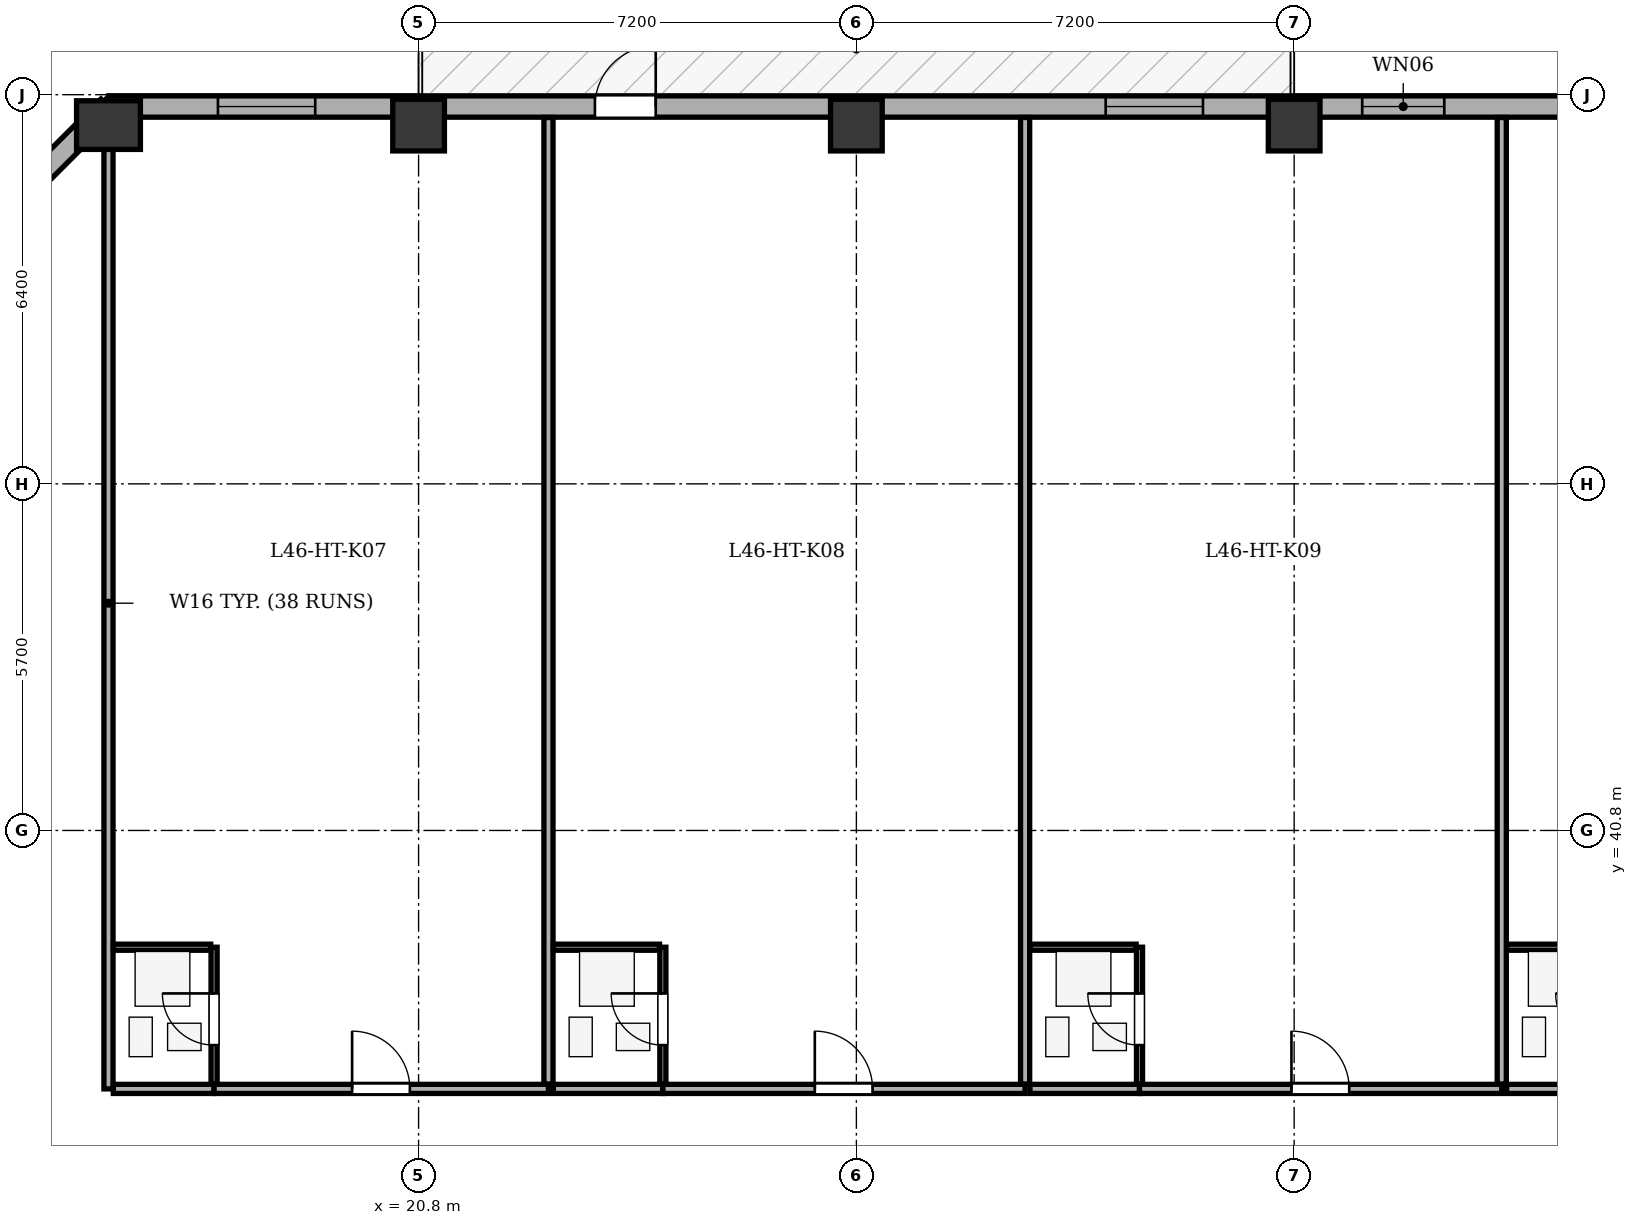
"""IFC4 building model, lengths in metres.
Left out: names, types, materials, properties, quantities, classifications, styles, units other than length and angle.
Written with IfcOpenShell. Run it as: python <this file> out.ifc"""

import sys

from ifc_helpers import new_model, si_unit, direction, frame, frame_2d, origin, origin_2d, place, context, subcontext, project, spatial, rectangle, extrude, element, fill, save


model = new_model("IFC4")
c1 = context("Model", 3, precision=1e-05, world=origin(), true_north=direction((0.0, 1.0)))
c2 = subcontext(c1, "Body", "Model", "MODEL_VIEW")
j1 = project(units=[si_unit("LENGTHUNIT", "METRE"), si_unit("PLANEANGLEUNIT", "RADIAN")], contexts=[c1])
p1 = place(None, origin())
s1 = spatial("IfcSite", under=j1, at=p1, CompositionType="ELEMENT")
p2 = place(p1, origin())
s2 = spatial("IfcBuilding", under=s1, at=p2, CompositionType="ELEMENT")
p3 = place(p2, frame((0.0, 0.0, 179.8)))
s3 = spatial("IfcBuildingStorey", under=s2, at=p3, CompositionType="ELEMENT", Elevation=179.8)
p4 = place(p3, frame((15.7, 52.4, 0.0), z_axis=(0.0, 0.0, 1.0), x_axis=(1.0, 0.0, 0.0)))
e1 = element("IfcColumn", 1, at=p4, inside=s3, PredefinedType="COLUMN", context=c2, shape_type="SweptSolid", body=[
    extrude(rectangle(XDim=0.8, YDim=1.05, at=origin_2d()), origin(), (0.0, 0.0, 1.0), 3.5),
])
for number, where, z_axis, x_axis in (
    (2, (20.8, 52.4, 0.0), (0.0, 0.0, 1.0), (1.0, 0.0, 0.0)),
    (3, (28.0, 52.4, 0.0), (0.0, 0.0, 1.0), (1.0, 0.0, 0.0)),
    (4, (35.2, 52.4, 0.0), (0.0, 0.0, 1.0), (1.0, 0.0, 0.0)),
):
    element("IfcColumn", number, at=place(p3, frame(where, z_axis=z_axis, x_axis=x_axis)), inside=s3, PredefinedType="COLUMN", context=c2, shape_type="SweptSolid", body=[
        extrude(rectangle(XDim=0.85, YDim=0.85, at=origin_2d()), origin(), (0.0, 0.0, 1.0), 3.5),
    ])
p5 = place(p3, frame((10.895, 47.9, 0.0), z_axis=(0.0, 0.0, 1.0), x_axis=(0.707088817216, 0.7071247447, 0.0)))
e5 = element("IfcWall", 5, at=p5, inside=s3, PredefinedType="STANDARD", context=c2, shape_type="SweptSolid", body=[
    extrude(rectangle(XDim=6.795, YDim=0.35, at=frame_2d((3.398, 0.0))), origin(), (0.0, 0.0, 1.0), 2.435),
])
p6 = place(p5, frame((2.698, 0.0, 0.75)))
e6 = element("IfcOpeningElement", 6, at=p6, cuts=e5, PredefinedType="OPENING", context=c2, shape_type="SweptSolid", body=[
    extrude(rectangle(XDim=1.4, YDim=1.565, at=frame_2d((0.7, 0.782))), frame((0.0, 0.185, 0.0), z_axis=(0.0, -1.0, 0.0), x_axis=(1.0, 0.0, 0.0)), (0.0, 0.0, 1.0), 0.37),
])
p7 = place(p3, frame((15.7, 52.705, 0.0), z_axis=(0.0, 0.0, 1.0), x_axis=(1.0, 0.0, 0.0)))
e7 = element("IfcWall", 7, at=p7, inside=s3, PredefinedType="STANDARD", context=c2, shape_type="SweptSolid", body=[
    extrude(rectangle(XDim=35.0, YDim=0.35, at=frame_2d((17.5, 0.0))), origin(), (0.0, 0.0, 1.0), 2.435),
])
p8 = place(p7, frame((8.0, 0.0, 0.0)))
e8 = element("IfcOpeningElement", 8, at=p8, cuts=e7, PredefinedType="OPENING", context=c2, shape_type="SweptSolid", body=[
    extrude(rectangle(XDim=1.0, YDim=2.02, at=frame_2d((0.5, 1.01))), frame((0.0, 0.185, 0.0), z_axis=(0.0, -1.0, 0.0), x_axis=(1.0, 0.0, 0.0)), (0.0, 0.0, 1.0), 0.37),
])
p9 = place(p7, frame((1.8, 0.0, 0.75)))
e9 = element("IfcOpeningElement", 9, at=p9, cuts=e7, PredefinedType="OPENING", context=c2, shape_type="SweptSolid", body=[
    extrude(rectangle(XDim=1.6, YDim=1.565, at=frame_2d((0.8, 0.782))), frame((0.0, 0.185, 0.0), z_axis=(0.0, -1.0, 0.0), x_axis=(1.0, 0.0, 0.0)), (0.0, 0.0, 1.0), 0.37),
])
p10 = place(p7, frame((16.4, 0.0, 0.75)))
e10 = element("IfcOpeningElement", 10, at=p10, cuts=e7, PredefinedType="OPENING", context=c2, shape_type="SweptSolid", body=[
    extrude(rectangle(XDim=1.6, YDim=1.565, at=frame_2d((0.8, 0.782))), frame((0.0, 0.185, 0.0), z_axis=(0.0, -1.0, 0.0), x_axis=(1.0, 0.0, 0.0)), (0.0, 0.0, 1.0), 0.37),
])
p11 = place(p7, frame((20.619, 0.0, 0.75)))
e11 = element("IfcOpeningElement", 11, at=p11, cuts=e7, PredefinedType="OPENING", context=c2, shape_type="SweptSolid", body=[
    extrude(rectangle(XDim=1.35, YDim=1.565, at=frame_2d((0.675, 0.782))), frame((0.0, 0.185, 0.0), z_axis=(0.0, -1.0, 0.0), x_axis=(1.0, 0.0, 0.0)), (0.0, 0.0, 1.0), 0.37),
])
p12 = place(p7, frame((24.807, 0.0, 0.75)))
e12 = element("IfcOpeningElement", 12, at=p12, cuts=e7, PredefinedType="OPENING", context=c2, shape_type="SweptSolid", body=[
    extrude(rectangle(XDim=1.6, YDim=1.565, at=frame_2d((0.8, 0.782))), frame((0.0, 0.185, 0.0), z_axis=(0.0, -1.0, 0.0), x_axis=(1.0, 0.0, 0.0)), (0.0, 0.0, 1.0), 0.37),
])
p13 = place(p7, frame((31.637, 0.0, 0.75)))
e13 = element("IfcOpeningElement", 13, at=p13, cuts=e7, PredefinedType="OPENING", context=c2, shape_type="SweptSolid", body=[
    extrude(rectangle(XDim=1.6, YDim=1.565, at=frame_2d((0.8, 0.782))), frame((0.0, 0.185, 0.0), z_axis=(0.0, -1.0, 0.0), x_axis=(1.0, 0.0, 0.0)), (0.0, 0.0, 1.0), 0.37),
])
p14 = place(p3, frame((15.7, 36.55, 0.0), z_axis=(0.0, 0.0, 1.0), x_axis=(0.0, 1.0, 0.0)))
e14 = element("IfcWall", 14, at=p14, inside=s3, PredefinedType="PARTITIONING", context=c2, shape_type="SweptSolid", body=[
    extrude(rectangle(XDim=15.975, YDim=0.15, at=frame_2d((7.987, 0.0))), origin(), (0.0, 0.0, 1.0), 3.05),
])
p15 = place(p3, frame((15.78, 36.55, 0.0), z_axis=(0.0, 0.0, 1.0), x_axis=(1.0, 0.0, 0.0)))
e15 = element("IfcWall", 15, at=p15, inside=s3, PredefinedType="PARTITIONING", context=c2, shape_type="SweptSolid", body=[
    extrude(rectangle(XDim=1.656, YDim=0.15, at=frame_2d((0.828, 0.0))), origin(), (0.0, 0.0, 1.0), 3.05),
])
p16 = place(p3, frame((17.437, 36.55, 0.0), z_axis=(0.0, 0.0, 1.0), x_axis=(1.0, 0.0, 0.0)))
e16 = element("IfcWall", 16, at=p16, inside=s3, PredefinedType="PARTITIONING", context=c2, shape_type="SweptSolid", body=[
    extrude(rectangle(XDim=5.5, YDim=0.15, at=frame_2d((2.75, 0.0))), origin(), (0.0, 0.0, 1.0), 3.05),
])
p17 = place(p16, frame((2.27, 0.0, 0.0)))
e17 = element("IfcOpeningElement", 17, at=p17, cuts=e16, PredefinedType="OPENING", context=c2, shape_type="SweptSolid", body=[
    extrude(rectangle(XDim=0.95, YDim=2.1, at=frame_2d((0.475, 1.05))), frame((0.0, 0.085, 0.0), z_axis=(0.0, -1.0, 0.0), x_axis=(1.0, 0.0, 0.0)), (0.0, 0.0, 1.0), 0.17),
])
p18 = place(p3, frame((17.437, 36.63, 0.0), z_axis=(0.0, 0.0, 1.0), x_axis=(0.0, 1.0, 0.0)))
e18 = element("IfcWall", 18, at=p18, inside=s3, PredefinedType="PARTITIONING", context=c2, shape_type="SweptSolid", body=[
    extrude(rectangle(XDim=2.25, YDim=0.1, at=frame_2d((1.125, 0.0))), origin(), (0.0, 0.0, 1.0), 3.05),
])
p19 = place(p18, frame((0.64, 0.0, 0.0)))
e19 = element("IfcOpeningElement", 19, at=p19, cuts=e18, PredefinedType="OPENING", context=c2, shape_type="SweptSolid", body=[
    extrude(rectangle(XDim=0.85, YDim=2.05, at=frame_2d((0.425, 1.025))), frame((0.0, 0.06, 0.0), z_axis=(0.0, -1.0, 0.0), x_axis=(1.0, 0.0, 0.0)), (0.0, 0.0, 1.0), 0.12),
])
p20 = place(p3, frame((15.78, 38.88, 0.0), z_axis=(0.0, 0.0, 1.0), x_axis=(1.0, 0.0, 0.0)))
e20 = element("IfcWall", 20, at=p20, inside=s3, PredefinedType="PARTITIONING", context=c2, shape_type="SweptSolid", body=[
    extrude(rectangle(XDim=1.602, YDim=0.1, at=frame_2d((0.801, 0.0))), origin(), (0.0, 0.0, 1.0), 3.05),
])
p21 = place(p3, frame((22.936, 36.63, 0.0), z_axis=(0.0, 0.0, 1.0), x_axis=(0.0, 1.0, 0.0)))
e21 = element("IfcWall", 21, at=p21, inside=s3, PredefinedType="PARTITIONING", context=c2, shape_type="SweptSolid", body=[
    extrude(rectangle(XDim=15.895, YDim=0.15, at=frame_2d((7.948, 0.0))), origin(), (0.0, 0.0, 1.0), 3.05),
])
p22 = place(p3, frame((23.016, 36.55, 0.0), z_axis=(0.0, 0.0, 1.0), x_axis=(1.0, 0.0, 0.0)))
e22 = element("IfcWall", 22, at=p22, inside=s3, PredefinedType="PARTITIONING", context=c2, shape_type="SweptSolid", body=[
    extrude(rectangle(XDim=1.801, YDim=0.15, at=frame_2d((0.901, 0.0))), origin(), (0.0, 0.0, 1.0), 3.05),
])
p23 = place(p3, frame((24.817, 36.55, 0.0), z_axis=(0.0, 0.0, 1.0), x_axis=(1.0, 0.0, 0.0)))
e23 = element("IfcWall", 23, at=p23, inside=s3, PredefinedType="PARTITIONING", context=c2, shape_type="SweptSolid", body=[
    extrude(rectangle(XDim=5.958, YDim=0.15, at=frame_2d((2.979, 0.0))), origin(), (0.0, 0.0, 1.0), 3.05),
])
p24 = place(p23, frame((2.499, 0.0, 0.0)))
e24 = element("IfcOpeningElement", 24, at=p24, cuts=e23, PredefinedType="OPENING", context=c2, shape_type="SweptSolid", body=[
    extrude(rectangle(XDim=0.95, YDim=2.1, at=frame_2d((0.475, 1.05))), frame((0.0, 0.085, 0.0), z_axis=(0.0, -1.0, 0.0), x_axis=(1.0, 0.0, 0.0)), (0.0, 0.0, 1.0), 0.17),
])
p25 = place(p3, frame((24.817, 36.63, 0.0), z_axis=(0.0, 0.0, 1.0), x_axis=(0.0, 1.0, 0.0)))
e25 = element("IfcWall", 25, at=p25, inside=s3, PredefinedType="PARTITIONING", context=c2, shape_type="SweptSolid", body=[
    extrude(rectangle(XDim=2.25, YDim=0.1, at=frame_2d((1.125, 0.0))), origin(), (0.0, 0.0, 1.0), 3.05),
])
p26 = place(p25, frame((0.64, 0.0, 0.0)))
e26 = element("IfcOpeningElement", 26, at=p26, cuts=e25, PredefinedType="OPENING", context=c2, shape_type="SweptSolid", body=[
    extrude(rectangle(XDim=0.85, YDim=2.05, at=frame_2d((0.425, 1.025))), frame((0.0, 0.06, 0.0), z_axis=(0.0, -1.0, 0.0), x_axis=(1.0, 0.0, 0.0)), (0.0, 0.0, 1.0), 0.12),
])
p27 = place(p3, frame((23.016, 38.88, 0.0), z_axis=(0.0, 0.0, 1.0), x_axis=(1.0, 0.0, 0.0)))
e27 = element("IfcWall", 27, at=p27, inside=s3, PredefinedType="PARTITIONING", context=c2, shape_type="SweptSolid", body=[
    extrude(rectangle(XDim=1.746, YDim=0.1, at=frame_2d((0.873, 0.0))), origin(), (0.0, 0.0, 1.0), 3.05),
])
p28 = place(p3, frame((30.775, 36.63, 0.0), z_axis=(0.0, 0.0, 1.0), x_axis=(0.0, 1.0, 0.0)))
e28 = element("IfcWall", 28, at=p28, inside=s3, PredefinedType="PARTITIONING", context=c2, shape_type="SweptSolid", body=[
    extrude(rectangle(XDim=15.895, YDim=0.15, at=frame_2d((7.948, 0.0))), origin(), (0.0, 0.0, 1.0), 3.05),
])
p29 = place(p3, frame((30.855, 36.55, 0.0), z_axis=(0.0, 0.0, 1.0), x_axis=(1.0, 0.0, 0.0)))
e29 = element("IfcWall", 29, at=p29, inside=s3, PredefinedType="PARTITIONING", context=c2, shape_type="SweptSolid", body=[
    extrude(rectangle(XDim=1.802, YDim=0.15, at=frame_2d((0.901, 0.0))), origin(), (0.0, 0.0, 1.0), 3.05),
])
p30 = place(p3, frame((32.656, 36.55, 0.0), z_axis=(0.0, 0.0, 1.0), x_axis=(1.0, 0.0, 0.0)))
e30 = element("IfcWall", 30, at=p30, inside=s3, PredefinedType="PARTITIONING", context=c2, shape_type="SweptSolid", body=[
    extrude(rectangle(XDim=5.958, YDim=0.15, at=frame_2d((2.979, 0.0))), origin(), (0.0, 0.0, 1.0), 3.05),
])
p31 = place(p30, frame((2.499, 0.0, 0.0)))
e31 = element("IfcOpeningElement", 31, at=p31, cuts=e30, PredefinedType="OPENING", context=c2, shape_type="SweptSolid", body=[
    extrude(rectangle(XDim=0.95, YDim=2.1, at=frame_2d((0.475, 1.05))), frame((0.0, 0.085, 0.0), z_axis=(0.0, -1.0, 0.0), x_axis=(1.0, 0.0, 0.0)), (0.0, 0.0, 1.0), 0.17),
])
p32 = place(p3, frame((32.656, 36.63, 0.0), z_axis=(0.0, 0.0, 1.0), x_axis=(0.0, 1.0, 0.0)))
e32 = element("IfcWall", 32, at=p32, inside=s3, PredefinedType="PARTITIONING", context=c2, shape_type="SweptSolid", body=[
    extrude(rectangle(XDim=2.25, YDim=0.1, at=frame_2d((1.125, 0.0))), origin(), (0.0, 0.0, 1.0), 3.05),
])
p33 = place(p32, frame((0.64, 0.0, 0.0)))
e33 = element("IfcOpeningElement", 33, at=p33, cuts=e32, PredefinedType="OPENING", context=c2, shape_type="SweptSolid", body=[
    extrude(rectangle(XDim=0.85, YDim=2.05, at=frame_2d((0.425, 1.025))), frame((0.0, 0.06, 0.0), z_axis=(0.0, -1.0, 0.0), x_axis=(1.0, 0.0, 0.0)), (0.0, 0.0, 1.0), 0.12),
])
p34 = place(p3, frame((30.855, 38.88, 0.0), z_axis=(0.0, 0.0, 1.0), x_axis=(1.0, 0.0, 0.0)))
e34 = element("IfcWall", 34, at=p34, inside=s3, PredefinedType="PARTITIONING", context=c2, shape_type="SweptSolid", body=[
    extrude(rectangle(XDim=1.746, YDim=0.1, at=frame_2d((0.873, 0.0))), origin(), (0.0, 0.0, 1.0), 3.05),
])
p35 = place(p3, frame((38.614, 36.63, 0.0), z_axis=(0.0, 0.0, 1.0), x_axis=(0.0, 1.0, 0.0)))
e35 = element("IfcWall", 35, at=p35, inside=s3, PredefinedType="PARTITIONING", context=c2, shape_type="SweptSolid", body=[
    extrude(rectangle(XDim=15.895, YDim=0.15, at=frame_2d((7.948, 0.0))), origin(), (0.0, 0.0, 1.0), 2.485),
])
p36 = place(p3, frame((38.694, 36.55, 0.0), z_axis=(0.0, 0.0, 1.0), x_axis=(1.0, 0.0, 0.0)))
e36 = element("IfcWall", 36, at=p36, inside=s3, PredefinedType="PARTITIONING", context=c2, shape_type="SweptSolid", body=[
    extrude(rectangle(XDim=1.656, YDim=0.15, at=frame_2d((0.828, 0.0))), origin(), (0.0, 0.0, 1.0), 3.05),
])
p37 = place(p3, frame((38.694, 38.88, 0.0), z_axis=(0.0, 0.0, 1.0), x_axis=(1.0, 0.0, 0.0)))
e37 = element("IfcWall", 37, at=p37, inside=s3, PredefinedType="PARTITIONING", context=c2, shape_type="SweptSolid", body=[
    extrude(rectangle(XDim=1.602, YDim=0.1, at=frame_2d((0.801, 0.0))), origin(), (0.0, 0.0, 1.0), 3.05),
])
p38 = place(p8, origin())
e38 = element("IfcDoor", 38, at=p38, inside=s3, OperationType="SINGLE_SWING_RIGHT", PredefinedType="DOOR", context=c2, shape_type="SweptSolid", body=[
    extrude(rectangle(XDim=1.0, YDim=2.02, at=frame_2d((0.5, 1.01))), frame((0.0, 0.025, 0.0), z_axis=(0.0, -1.0, 0.0), x_axis=(1.0, 0.0, 0.0)), (0.0, 0.0, 1.0), 0.05),
])
fill(e8, e38)
p39 = place(p9, origin())
e39 = element("IfcWindow", 39, at=p39, inside=s3, PartitioningType="SINGLE_PANEL", PredefinedType="WINDOW", context=c2, shape_type="SweptSolid", body=[
    extrude(rectangle(XDim=1.6, YDim=1.565, at=frame_2d((0.8, 0.782))), frame((0.0, -0.01, 0.0), z_axis=(0.0, -1.0, 0.0), x_axis=(1.0, 0.0, 0.0)), (0.0, 0.0, 1.0), 0.06),
])
fill(e9, e39)
p40 = place(p10, origin())
e40 = element("IfcWindow", 40, at=p40, inside=s3, PartitioningType="SINGLE_PANEL", PredefinedType="WINDOW", context=c2, shape_type="SweptSolid", body=[
    extrude(rectangle(XDim=1.6, YDim=1.565, at=frame_2d((0.8, 0.782))), frame((0.0, -0.01, 0.0), z_axis=(0.0, -1.0, 0.0), x_axis=(1.0, 0.0, 0.0)), (0.0, 0.0, 1.0), 0.06),
])
fill(e10, e40)
p41 = place(p11, origin())
e41 = element("IfcWindow", 41, at=p41, inside=s3, PartitioningType="SINGLE_PANEL", PredefinedType="WINDOW", context=c2, shape_type="SweptSolid", body=[
    extrude(rectangle(XDim=1.35, YDim=1.565, at=frame_2d((0.675, 0.782))), frame((0.0, -0.01, 0.0), z_axis=(0.0, -1.0, 0.0), x_axis=(1.0, 0.0, 0.0)), (0.0, 0.0, 1.0), 0.06),
])
fill(e11, e41)
p42 = place(p19, origin())
e42 = element("IfcDoor", 42, at=p42, inside=s3, OperationType="SINGLE_SWING_RIGHT", PredefinedType="DOOR", context=c2, shape_type="SweptSolid", body=[
    extrude(rectangle(XDim=0.85, YDim=2.05, at=frame_2d((0.425, 1.025))), frame((0.0, 0.025, 0.0), z_axis=(0.0, -1.0, 0.0), x_axis=(1.0, 0.0, 0.0)), (0.0, 0.0, 1.0), 0.05),
])
fill(e19, e42)
p43 = place(p17, origin())
e43 = element("IfcDoor", 43, at=p43, inside=s3, OperationType="SINGLE_SWING_LEFT", PredefinedType="DOOR", context=c2, shape_type="SweptSolid", body=[
    extrude(rectangle(XDim=0.95, YDim=2.1, at=frame_2d((0.475, 1.05))), frame((0.0, 0.025, 0.0), z_axis=(0.0, -1.0, 0.0), x_axis=(1.0, 0.0, 0.0)), (0.0, 0.0, 1.0), 0.05),
])
fill(e17, e43)
p44 = place(p26, origin())
e44 = element("IfcDoor", 44, at=p44, inside=s3, OperationType="SINGLE_SWING_RIGHT", PredefinedType="DOOR", context=c2, shape_type="SweptSolid", body=[
    extrude(rectangle(XDim=0.85, YDim=2.05, at=frame_2d((0.425, 1.025))), frame((0.0, 0.025, 0.0), z_axis=(0.0, -1.0, 0.0), x_axis=(1.0, 0.0, 0.0)), (0.0, 0.0, 1.0), 0.05),
])
fill(e26, e44)
p45 = place(p24, origin())
e45 = element("IfcDoor", 45, at=p45, inside=s3, OperationType="SINGLE_SWING_LEFT", PredefinedType="DOOR", context=c2, shape_type="SweptSolid", body=[
    extrude(rectangle(XDim=0.95, YDim=2.1, at=frame_2d((0.475, 1.05))), frame((0.0, 0.025, 0.0), z_axis=(0.0, -1.0, 0.0), x_axis=(1.0, 0.0, 0.0)), (0.0, 0.0, 1.0), 0.05),
])
fill(e24, e45)
p46 = place(p33, origin())
e46 = element("IfcDoor", 46, at=p46, inside=s3, OperationType="SINGLE_SWING_RIGHT", PredefinedType="DOOR", context=c2, shape_type="SweptSolid", body=[
    extrude(rectangle(XDim=0.85, YDim=2.05, at=frame_2d((0.425, 1.025))), frame((0.0, 0.025, 0.0), z_axis=(0.0, -1.0, 0.0), x_axis=(1.0, 0.0, 0.0)), (0.0, 0.0, 1.0), 0.05),
])
fill(e33, e46)
p47 = place(p31, origin())
e47 = element("IfcDoor", 47, at=p47, inside=s3, OperationType="SINGLE_SWING_LEFT", PredefinedType="DOOR", context=c2, shape_type="SweptSolid", body=[
    extrude(rectangle(XDim=0.95, YDim=2.1, at=frame_2d((0.475, 1.05))), frame((0.0, 0.025, 0.0), z_axis=(0.0, -1.0, 0.0), x_axis=(1.0, 0.0, 0.0)), (0.0, 0.0, 1.0), 0.05),
])
fill(e31, e47)
save(model, sys.argv[1])
